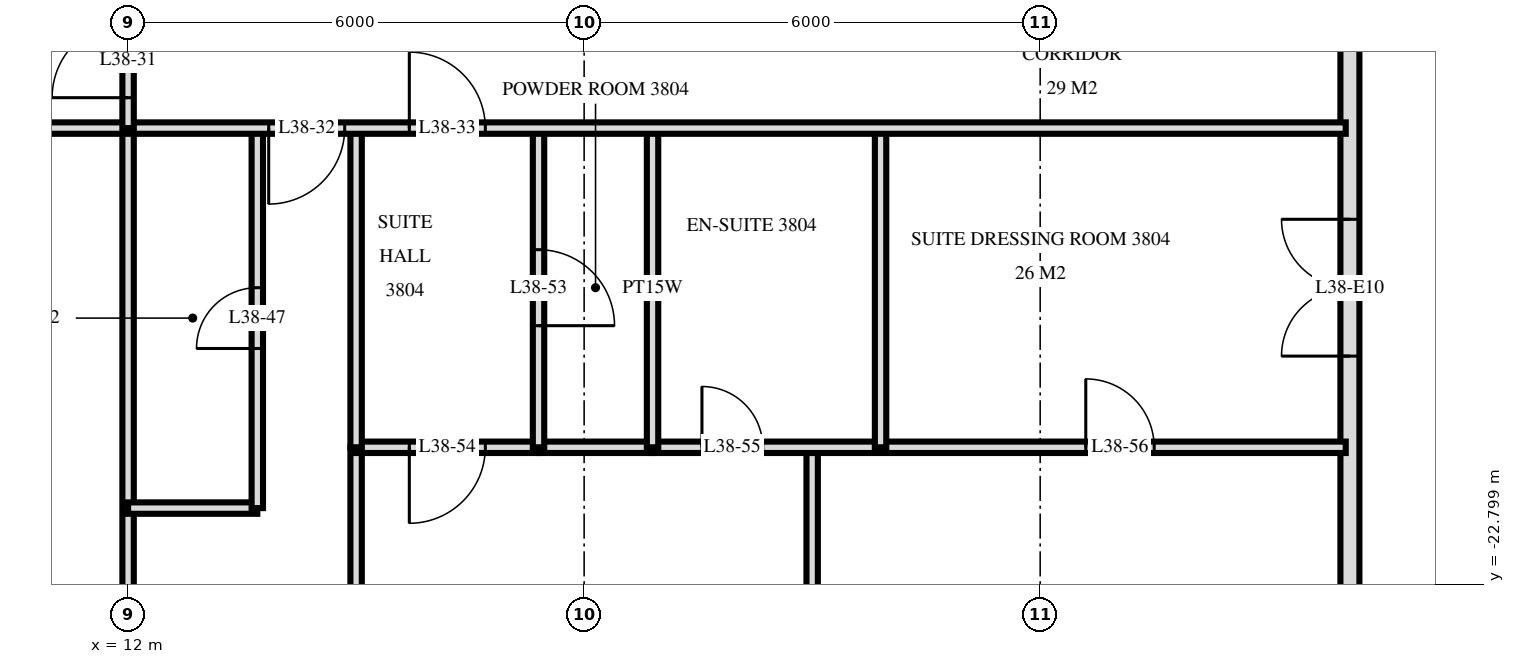
"""IFC4 building model, lengths in metres.
Left out: names, types, materials, properties, quantities, classifications, styles, units other than length and angle.
Written with IfcOpenShell. Run it as: python <this file> out.ifc"""

import sys

from ifc_helpers import new_model, si_unit, direction, frame, frame_2d, origin, place, context, subcontext, project, spatial, rectangle, extrude, element, fill, save


model = new_model("IFC4")
c1 = context("Model", 3, precision=1e-05, world=origin(), true_north=direction((0.0, 1.0)))
c2 = subcontext(c1, "Body", "Model", "MODEL_VIEW")
j1 = project(units=[si_unit("LENGTHUNIT", "METRE"), si_unit("PLANEANGLEUNIT", "RADIAN")], contexts=[c1])
p1 = place(None, origin())
s1 = spatial("IfcSite", under=j1, at=p1, CompositionType="ELEMENT")
p2 = place(p1, origin())
s2 = spatial("IfcBuilding", under=s1, at=p2, CompositionType="ELEMENT")
p3 = place(p2, frame((0.0, 0.0, 148.8)))
s3 = spatial("IfcBuildingStorey", under=s2, at=p3, CompositionType="ELEMENT", Elevation=148.8)
p4 = place(p3, frame((28.075, -29.275, 0.0), z_axis=(0.0, 0.0, 1.0), x_axis=(0.0, 1.0, 0.0)))
e1 = element("IfcWall", 1, at=p4, inside=s3, PredefinedType="SOLIDWALL", context=c2, shape_type="SweptSolid", body=[
    extrude(rectangle(XDim=25.951, YDim=0.25, at=frame_2d((12.975, 0.0))), origin(), (0.0, 0.0, 1.0), 3.32),
])
p5 = place(p4, frame((0.575, 0.0, 0.0)))
e2 = element("IfcOpeningElement", 2, at=p5, cuts=e1, PredefinedType="OPENING", context=c2, shape_type="SweptSolid", body=[
    extrude(rectangle(XDim=1.8, YDim=2.4, at=frame_2d((0.9, 1.2))), frame((0.0, 0.135, 0.0), z_axis=(0.0, -1.0, 0.0), x_axis=(1.0, 0.0, 0.0)), (0.0, 0.0, 1.0), 0.27),
])
p6 = place(p4, frame((3.325, 0.0, 0.3)))
e3 = element("IfcOpeningElement", 3, at=p6, cuts=e1, PredefinedType="OPENING", context=c2, shape_type="SweptSolid", body=[
    extrude(rectangle(XDim=1.8, YDim=2.1, at=frame_2d((0.9, 1.05))), frame((0.0, 0.135, 0.0), z_axis=(0.0, -1.0, 0.0), x_axis=(1.0, 0.0, 0.0)), (0.0, 0.0, 1.0), 0.27),
])
p7 = place(p4, frame((9.475, 0.0, 0.0)))
e4 = element("IfcOpeningElement", 4, at=p7, cuts=e1, PredefinedType="OPENING", context=c2, shape_type="SweptSolid", body=[
    extrude(rectangle(XDim=1.8, YDim=2.4, at=frame_2d((0.9, 1.2))), frame((0.0, 0.135, 0.0), z_axis=(0.0, -1.0, 0.0), x_axis=(1.0, 0.0, 0.0)), (0.0, 0.0, 1.0), 0.27),
])
p8 = place(p4, frame((14.575, 0.0, 0.3)))
e5 = element("IfcOpeningElement", 5, at=p8, cuts=e1, PredefinedType="OPENING", context=c2, shape_type="SweptSolid", body=[
    extrude(rectangle(XDim=2.4, YDim=2.1, at=frame_2d((1.2, 1.05))), frame((0.0, 0.135, 0.0), z_axis=(0.0, -1.0, 0.0), x_axis=(1.0, 0.0, 0.0)), (0.0, 0.0, 1.0), 0.27),
])
p9 = place(p4, frame((17.875, 0.0, 0.0)))
e6 = element("IfcOpeningElement", 6, at=p9, cuts=e1, PredefinedType="OPENING", context=c2, shape_type="SweptSolid", body=[
    extrude(rectangle(XDim=1.8, YDim=2.4, at=frame_2d((0.9, 1.2))), frame((0.0, 0.135, 0.0), z_axis=(0.0, -1.0, 0.0), x_axis=(1.0, 0.0, 0.0)), (0.0, 0.0, 1.0), 0.27),
])
p10 = place(p3, frame((21.9, -21.0, 0.0), z_axis=(0.0, 0.0, 1.0), x_axis=(0.0, 1.0, 0.0)))
e7 = element("IfcWall", 7, at=p10, inside=s3, PredefinedType="PARTITIONING", context=c2, shape_type="SweptSolid", body=[
    extrude(rectangle(XDim=4.2, YDim=0.15, at=frame_2d((2.1, 0.0))), origin(), (0.0, 0.0, 1.0), 3.32),
])
p11 = place(p3, frame((21.0, -33.62, 0.0), z_axis=(0.0, 0.0, 1.0), x_axis=(0.0, 1.0, 0.0)))
e8 = element("IfcWall", 8, at=p11, inside=s3, PredefinedType="PARTITIONING", context=c2, shape_type="SweptSolid", body=[
    extrude(rectangle(XDim=12.62, YDim=0.15, at=frame_2d((6.31, 0.0))), origin(), (0.0, 0.0, 1.0), 3.32),
])
p12 = place(p11, frame((5.77, 0.0, 0.0)))
e9 = element("IfcOpeningElement", 9, at=p12, cuts=e8, PredefinedType="OPENING", context=c2, shape_type="SweptSolid", body=[
    extrude(rectangle(XDim=0.9, YDim=2.1, at=frame_2d((0.45, 1.05))), frame((0.0, 0.085, 0.0), z_axis=(0.0, -1.0, 0.0), x_axis=(1.0, 0.0, 0.0)), (0.0, 0.0, 1.0), 0.17),
])
p13 = place(p3, frame((18.9, -21.0, 0.0), z_axis=(0.0, 0.0, 1.0), x_axis=(0.0, 1.0, 0.0)))
e10 = element("IfcWall", 10, at=p13, inside=s3, PredefinedType="PLUMBINGWALL", context=c2, shape_type="SweptSolid", body=[
    extrude(rectangle(XDim=4.2, YDim=0.15, at=frame_2d((2.1, 0.0))), origin(), (0.0, 0.0, 1.0), 3.32),
])
p14 = place(p3, frame((17.4, -21.0, 0.0), z_axis=(0.0, 0.0, 1.0), x_axis=(0.0, 1.0, 0.0)))
e11 = element("IfcWall", 11, at=p14, inside=s3, PredefinedType="PARTITIONING", context=c2, shape_type="SweptSolid", body=[
    extrude(rectangle(XDim=4.2, YDim=0.15, at=frame_2d((2.1, 0.0))), origin(), (0.0, 0.0, 1.0), 3.32),
])
p15 = place(p14, frame((1.6, 0.0, 0.0)))
e12 = element("IfcOpeningElement", 12, at=p15, cuts=e11, PredefinedType="OPENING", context=c2, shape_type="SweptSolid", body=[
    extrude(rectangle(XDim=1.0, YDim=2.1, at=frame_2d((0.5, 1.05))), frame((0.0, 0.085, 0.0), z_axis=(0.0, -1.0, 0.0), x_axis=(1.0, 0.0, 0.0)), (0.0, 0.0, 1.0), 0.17),
])
p16 = place(p3, frame((15.0, -21.0, 0.0), z_axis=(0.0, 0.0, 1.0), x_axis=(0.0, 1.0, 0.0)))
e13 = element("IfcWall", 13, at=p16, inside=s3, PredefinedType="PARTITIONING", context=c2, shape_type="SweptSolid", body=[
    extrude(rectangle(XDim=4.2, YDim=0.15, at=frame_2d((2.1, 0.0))), origin(), (0.0, 0.0, 1.0), 3.32),
])
p17 = place(p3, frame((15.0, -33.62, 0.0), z_axis=(0.0, 0.0, 1.0), x_axis=(0.0, 1.0, 0.0)))
e14 = element("IfcWall", 14, at=p17, inside=s3, PredefinedType="PARTITIONING", context=c2, shape_type="SweptSolid", body=[
    extrude(rectangle(XDim=12.62, YDim=0.15, at=frame_2d((6.31, 0.0))), origin(), (0.0, 0.0, 1.0), 3.32),
])
p18 = place(p3, frame((13.7, -21.8, 0.0), z_axis=(0.0, 0.0, 1.0), x_axis=(0.0, 1.0, 0.0)))
e15 = element("IfcWall", 15, at=p18, inside=s3, PredefinedType="PARTITIONING", context=c2, shape_type="SweptSolid", body=[
    extrude(rectangle(XDim=5.0, YDim=0.15, at=frame_2d((2.5, 0.0))), origin(), (0.0, 0.0, 1.0), 3.32),
])
p19 = place(p18, frame((2.1, 0.0, 0.0)))
e16 = element("IfcOpeningElement", 16, at=p19, cuts=e15, PredefinedType="OPENING", context=c2, shape_type="SweptSolid", body=[
    extrude(rectangle(XDim=0.8, YDim=2.1, at=frame_2d((0.4, 1.05))), frame((0.0, 0.085, 0.0), z_axis=(0.0, -1.0, 0.0), x_axis=(1.0, 0.0, 0.0)), (0.0, 0.0, 1.0), 0.17),
])
p20 = place(p3, frame((12.0, -16.8, 0.0), z_axis=(0.0, 0.0, 1.0), x_axis=(0.0, 1.0, 0.0)))
e17 = element("IfcWall", 17, at=p20, inside=s3, PredefinedType="PARTITIONING", context=c2, shape_type="SweptSolid", body=[
    extrude(rectangle(XDim=1.75, YDim=0.15, at=frame_2d((0.875, 0.0))), origin(), (0.0, 0.0, 1.0), 3.32),
])
p21 = place(p20, frame((0.4, 0.0, 0.0)))
e18 = element("IfcOpeningElement", 18, at=p21, cuts=e17, PredefinedType="OPENING", context=c2, shape_type="SweptSolid", body=[
    extrude(rectangle(XDim=1.0, YDim=2.1, at=frame_2d((0.5, 1.05))), frame((0.0, 0.085, 0.0), z_axis=(0.0, -1.0, 0.0), x_axis=(1.0, 0.0, 0.0)), (0.0, 0.0, 1.0), 0.17),
])
p22 = place(p3, frame((12.0, -33.62, 0.0), z_axis=(0.0, 0.0, 1.0), x_axis=(0.0, 1.0, 0.0)))
e19 = element("IfcWall", 19, at=p22, inside=s3, PredefinedType="PARTITIONING", context=c2, shape_type="SweptSolid", body=[
    extrude(rectangle(XDim=16.82, YDim=0.15, at=frame_2d((8.41, 0.0))), origin(), (0.0, 0.0, 1.0), 3.32),
])
p23 = place(p3, frame((12.0, -21.8, 0.0), z_axis=(0.0, 0.0, 1.0), x_axis=(1.0, 0.0, 0.0)))
e20 = element("IfcWall", 20, at=p23, inside=s3, PredefinedType="PARTITIONING", context=c2, shape_type="SweptSolid", body=[
    extrude(rectangle(XDim=1.7, YDim=0.15, at=frame_2d((0.85, 0.0))), origin(), (0.0, 0.0, 1.0), 3.32),
])
p24 = place(p3, frame((15.0, -21.0, 0.0), z_axis=(0.0, 0.0, 1.0), x_axis=(1.0, 0.0, 0.0)))
e21 = element("IfcWall", 21, at=p24, inside=s3, PredefinedType="PARTITIONING", context=c2, shape_type="SweptSolid", body=[
    extrude(rectangle(XDim=2.4, YDim=0.15, at=frame_2d((1.2, 0.0))), origin(), (0.0, 0.0, 1.0), 3.32),
])
p25 = place(p24, frame((0.7, 0.0, 0.0)))
e22 = element("IfcOpeningElement", 22, at=p25, cuts=e21, PredefinedType="OPENING", context=c2, shape_type="SweptSolid", body=[
    extrude(rectangle(XDim=1.0, YDim=2.1, at=frame_2d((0.5, 1.05))), frame((0.0, 0.085, 0.0), z_axis=(0.0, -1.0, 0.0), x_axis=(1.0, 0.0, 0.0)), (0.0, 0.0, 1.0), 0.17),
])
p26 = place(p3, frame((18.9, -21.0, 0.0), z_axis=(0.0, 0.0, 1.0), x_axis=(1.0, 0.0, 0.0)))
e23 = element("IfcWall", 23, at=p26, inside=s3, PredefinedType="PARTITIONING", context=c2, shape_type="SweptSolid", body=[
    extrude(rectangle(XDim=9.12, YDim=0.15, at=frame_2d((4.56, 0.0))), origin(), (0.0, 0.0, 1.0), 3.32),
])
p27 = place(p26, frame((0.65, 0.0, 0.0)))
e24 = element("IfcOpeningElement", 24, at=p27, cuts=e23, PredefinedType="OPENING", context=c2, shape_type="SweptSolid", body=[
    extrude(rectangle(XDim=0.8, YDim=2.1, at=frame_2d((0.4, 1.05))), frame((0.0, 0.085, 0.0), z_axis=(0.0, -1.0, 0.0), x_axis=(1.0, 0.0, 0.0)), (0.0, 0.0, 1.0), 0.17),
])
p28 = place(p26, frame((5.7, 0.0, 0.0)))
e25 = element("IfcOpeningElement", 25, at=p28, cuts=e23, PredefinedType="OPENING", context=c2, shape_type="SweptSolid", body=[
    extrude(rectangle(XDim=0.9, YDim=2.1, at=frame_2d((0.45, 1.05))), frame((0.0, 0.085, 0.0), z_axis=(0.0, -1.0, 0.0), x_axis=(1.0, 0.0, 0.0)), (0.0, 0.0, 1.0), 0.17),
])
p29 = place(p3, frame((17.4, -21.0, 0.0), z_axis=(0.0, 0.0, 1.0), x_axis=(1.0, 0.0, 0.0)))
e26 = element("IfcWall", 26, at=p29, inside=s3, PredefinedType="PLUMBINGWALL", context=c2, shape_type="SweptSolid", body=[
    extrude(rectangle(XDim=1.5, YDim=0.15, at=frame_2d((0.75, 0.0))), origin(), (0.0, 0.0, 1.0), 3.32),
])
p30 = place(p3, frame((-28.02, -16.8, 0.0), z_axis=(0.0, 0.0, 1.0), x_axis=(1.0, 0.0, 0.0)))
e27 = element("IfcWall", 27, at=p30, inside=s3, PredefinedType="PARTITIONING", context=c2, shape_type="SweptSolid", body=[
    extrude(rectangle(XDim=56.04, YDim=0.15, at=frame_2d((28.02, 0.0))), origin(), (0.0, 0.0, 1.0), 3.32),
])
p31 = place(p30, frame((13.17, 0.0, 0.0)))
e28 = element("IfcOpeningElement", 28, at=p31, cuts=e27, PredefinedType="OPENING", context=c2, shape_type="SweptSolid", body=[
    extrude(rectangle(XDim=1.0, YDim=2.1, at=frame_2d((0.5, 1.05))), frame((0.0, 0.085, 0.0), z_axis=(0.0, -1.0, 0.0), x_axis=(1.0, 0.0, 0.0)), (0.0, 0.0, 1.0), 0.17),
])
p32 = place(p30, frame((11.32, 0.0, 0.0)))
e29 = element("IfcOpeningElement", 29, at=p32, cuts=e27, PredefinedType="OPENING", context=c2, shape_type="SweptSolid", body=[
    extrude(rectangle(XDim=1.0, YDim=2.1, at=frame_2d((0.5, 1.05))), frame((0.0, 0.085, 0.0), z_axis=(0.0, -1.0, 0.0), x_axis=(1.0, 0.0, 0.0)), (0.0, 0.0, 1.0), 0.17),
])
p33 = place(p30, frame((41.87, 0.0, 0.0)))
e30 = element("IfcOpeningElement", 30, at=p33, cuts=e27, PredefinedType="OPENING", context=c2, shape_type="SweptSolid", body=[
    extrude(rectangle(XDim=1.0, YDim=2.1, at=frame_2d((0.5, 1.05))), frame((0.0, 0.085, 0.0), z_axis=(0.0, -1.0, 0.0), x_axis=(1.0, 0.0, 0.0)), (0.0, 0.0, 1.0), 0.17),
])
p34 = place(p30, frame((43.72, 0.0, 0.0)))
e31 = element("IfcOpeningElement", 31, at=p34, cuts=e27, PredefinedType="OPENING", context=c2, shape_type="SweptSolid", body=[
    extrude(rectangle(XDim=1.0, YDim=2.1, at=frame_2d((0.5, 1.05))), frame((0.0, 0.085, 0.0), z_axis=(0.0, -1.0, 0.0), x_axis=(1.0, 0.0, 0.0)), (0.0, 0.0, 1.0), 0.17),
])
p35 = place(p30, frame((19.52, 0.0, 0.0)))
e32 = element("IfcOpeningElement", 32, at=p35, cuts=e27, PredefinedType="OPENING", context=c2, shape_type="SweptSolid", body=[
    extrude(rectangle(XDim=1.0, YDim=2.1, at=frame_2d((0.5, 1.05))), frame((0.0, 0.085, 0.0), z_axis=(0.0, -1.0, 0.0), x_axis=(1.0, 0.0, 0.0)), (0.0, 0.0, 1.0), 0.17),
])
p36 = place(p30, frame((27.52, 0.0, 0.0)))
e33 = element("IfcOpeningElement", 33, at=p36, cuts=e27, PredefinedType="OPENING", context=c2, shape_type="SweptSolid", body=[
    extrude(rectangle(XDim=1.0, YDim=2.1, at=frame_2d((0.5, 1.05))), frame((0.0, 0.085, 0.0), z_axis=(0.0, -1.0, 0.0), x_axis=(1.0, 0.0, 0.0)), (0.0, 0.0, 1.0), 0.17),
])
p37 = place(p30, frame((35.52, 0.0, 0.0)))
e34 = element("IfcOpeningElement", 34, at=p37, cuts=e27, PredefinedType="OPENING", context=c2, shape_type="SweptSolid", body=[
    extrude(rectangle(XDim=1.0, YDim=2.1, at=frame_2d((0.5, 1.05))), frame((0.0, 0.085, 0.0), z_axis=(0.0, -1.0, 0.0), x_axis=(1.0, 0.0, 0.0)), (0.0, 0.0, 1.0), 0.17),
])
p38 = place(p7, origin())
e35 = element("IfcDoor", 35, at=p38, inside=s3, OperationType="DOUBLE_DOOR_SINGLE_SWING", PredefinedType="DOOR", context=c2, shape_type="SweptSolid", body=[
    extrude(rectangle(XDim=1.8, YDim=2.4, at=frame_2d((0.9, 1.2))), frame((0.0, 0.025, 0.0), z_axis=(0.0, -1.0, 0.0), x_axis=(1.0, 0.0, 0.0)), (0.0, 0.0, 1.0), 0.05),
])
fill(e4, e35)
p39 = place(p21, origin())
e36 = element("IfcDoor", 36, at=p39, inside=s3, OperationType="SINGLE_SWING_RIGHT", PredefinedType="DOOR", context=c2, shape_type="SweptSolid", body=[
    extrude(rectangle(XDim=1.0, YDim=2.1, at=frame_2d((0.5, 1.05))), frame((0.0, 0.025, 0.0), z_axis=(0.0, -1.0, 0.0), x_axis=(1.0, 0.0, 0.0)), (0.0, 0.0, 1.0), 0.05),
])
fill(e18, e36)
p40 = place(p33, frame((0.5, 0.0, 0.0), z_axis=(0.0, 0.0, 1.0), x_axis=(-1.0, 0.0, 0.0)))
e37 = element("IfcDoor", 37, at=p40, inside=s3, OperationType="SINGLE_SWING_LEFT", PredefinedType="DOOR", context=c2, shape_type="SweptSolid", body=[
    extrude(rectangle(XDim=1.0, YDim=2.1, at=frame_2d((0.0, 1.05))), frame((0.0, -0.025, 0.0), z_axis=(0.0, 1.0, 0.0), x_axis=(-1.0, 0.0, 0.0)), (0.0, 0.0, 1.0), 0.05),
])
fill(e30, e37)
p41 = place(p34, origin())
e38 = element("IfcDoor", 38, at=p41, inside=s3, OperationType="SINGLE_SWING_RIGHT", PredefinedType="DOOR", context=c2, shape_type="SweptSolid", body=[
    extrude(rectangle(XDim=1.0, YDim=2.1, at=frame_2d((0.5, 1.05))), frame((0.0, 0.025, 0.0), z_axis=(0.0, -1.0, 0.0), x_axis=(1.0, 0.0, 0.0)), (0.0, 0.0, 1.0), 0.05),
])
fill(e31, e38)
p42 = place(p19, origin())
e39 = element("IfcDoor", 39, at=p42, inside=s3, OperationType="SINGLE_SWING_RIGHT", PredefinedType="DOOR", context=c2, shape_type="SweptSolid", body=[
    extrude(rectangle(XDim=0.8, YDim=2.1, at=frame_2d((0.4, 1.05))), frame((0.0, 0.025, 0.0), z_axis=(0.0, -1.0, 0.0), x_axis=(1.0, 0.0, 0.0)), (0.0, 0.0, 1.0), 0.05),
])
fill(e16, e39)
p43 = place(p15, frame((0.5, 0.0, 0.0), z_axis=(0.0, 0.0, 1.0), x_axis=(-1.0, 0.0, 0.0)))
e40 = element("IfcDoor", 40, at=p43, inside=s3, OperationType="SINGLE_SWING_LEFT", PredefinedType="DOOR", context=c2, shape_type="SweptSolid", body=[
    extrude(rectangle(XDim=1.0, YDim=2.1, at=frame_2d((0.0, 1.05))), frame((0.0, -0.025, 0.0), z_axis=(0.0, 1.0, 0.0), x_axis=(-1.0, 0.0, 0.0)), (0.0, 0.0, 1.0), 0.05),
])
fill(e12, e40)
p44 = place(p25, frame((0.5, 0.0, 0.0), z_axis=(0.0, 0.0, 1.0), x_axis=(-1.0, 0.0, 0.0)))
e41 = element("IfcDoor", 41, at=p44, inside=s3, OperationType="SINGLE_SWING_LEFT", PredefinedType="DOOR", context=c2, shape_type="SweptSolid", body=[
    extrude(rectangle(XDim=1.0, YDim=2.1, at=frame_2d((0.0, 1.05))), frame((0.0, -0.025, 0.0), z_axis=(0.0, 1.0, 0.0), x_axis=(-1.0, 0.0, 0.0)), (0.0, 0.0, 1.0), 0.05),
])
fill(e22, e41)
p45 = place(p27, origin())
e42 = element("IfcDoor", 42, at=p45, inside=s3, OperationType="SINGLE_SWING_RIGHT", PredefinedType="DOOR", context=c2, shape_type="SweptSolid", body=[
    extrude(rectangle(XDim=0.8, YDim=2.1, at=frame_2d((0.4, 1.05))), frame((0.0, 0.025, 0.0), z_axis=(0.0, -1.0, 0.0), x_axis=(1.0, 0.0, 0.0)), (0.0, 0.0, 1.0), 0.05),
])
fill(e24, e42)
p46 = place(p28, origin())
e43 = element("IfcDoor", 43, at=p46, inside=s3, OperationType="SINGLE_SWING_RIGHT", PredefinedType="DOOR", context=c2, shape_type="SweptSolid", body=[
    extrude(rectangle(XDim=0.9, YDim=2.1, at=frame_2d((0.45, 1.05))), frame((0.0, 0.025, 0.0), z_axis=(0.0, -1.0, 0.0), x_axis=(1.0, 0.0, 0.0)), (0.0, 0.0, 1.0), 0.05),
])
fill(e25, e43)
save(model, sys.argv[1])
